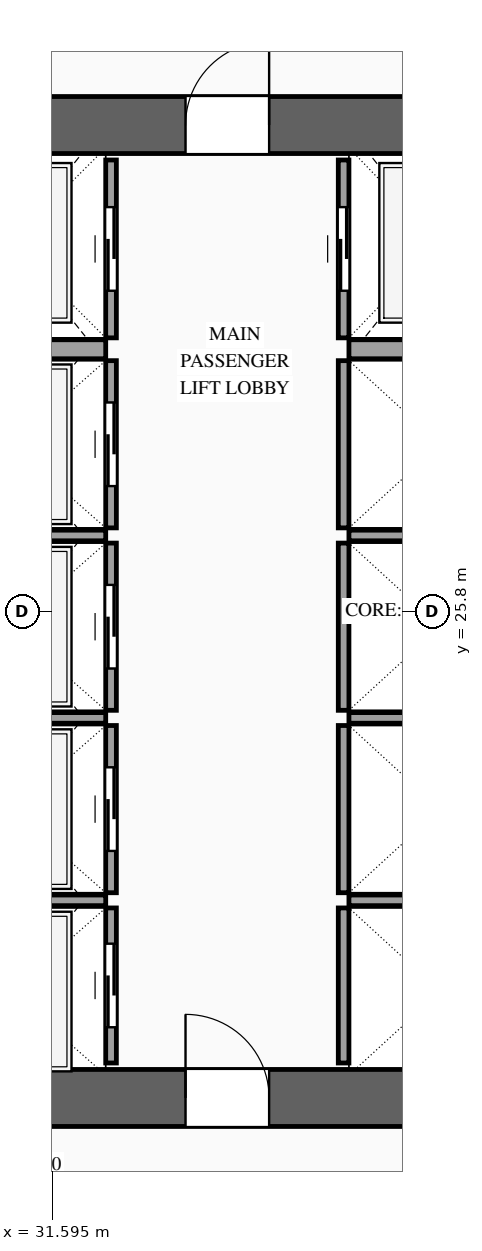
"""IFC4 building model, lengths in metres.
Left out: names, types, materials, properties, quantities, classifications, styles, units other than length and angle.
Written with IfcOpenShell. Run it as: python <this file> out.ifc"""

import sys

from ifc_helpers import new_model, si_unit, direction, frame, frame_2d, origin, place, context, subcontext, project, spatial, rectangle, extrude, source, transform, mapped, element, fill, save


model = new_model("IFC4")
c1 = context("Model", 3, precision=1e-05, world=origin(), true_north=direction((0.0, 1.0)))
c2 = subcontext(c1, "Body", "Model", "MODEL_VIEW")
j1 = project(units=[si_unit("LENGTHUNIT", "METRE"), si_unit("PLANEANGLEUNIT", "RADIAN")], contexts=[c1])
p1 = place(None, origin())
s1 = spatial("IfcSite", under=j1, at=p1, CompositionType="ELEMENT")
p2 = place(p1, origin())
s2 = spatial("IfcBuilding", under=s1, at=p2, CompositionType="ELEMENT")
p3 = place(p2, frame((0.0, 0.0, 163.2)))
s3 = spatial("IfcBuildingStorey", under=s2, at=p3, CompositionType="ELEMENT", Elevation=163.2)
p4 = place(p3, frame((23.425, 19.4, 0.0), z_axis=(0.0, 0.0, 1.0), x_axis=(1.0, 0.0, 0.0)))
e1 = element("IfcWall", 1, at=p4, inside=s3, PredefinedType="SHEAR", context=c2, shape_type="SweptSolid", body=[
    extrude(rectangle(XDim=27.15, YDim=0.75, at=frame_2d((13.575, 0.0))), origin(), (0.0, 0.0, 1.0), 3.6),
])
p5 = place(p4, frame((2.025, 0.0, 0.0)))
e2 = element("IfcOpeningElement", 2, at=p5, cuts=e1, PredefinedType="OPENING", context=c2, shape_type="SweptSolid", body=[
    extrude(rectangle(XDim=1.1, YDim=2.2, at=frame_2d((0.55, 1.1))), frame((0.0, 0.39, 0.0), z_axis=(0.0, -1.0, 0.0), x_axis=(1.0, 0.0, 0.0)), (0.0, 0.0, 1.0), 0.78),
])
p6 = place(p4, frame((9.925, 0.0, 0.0)))
e3 = element("IfcOpeningElement", 3, at=p6, cuts=e1, PredefinedType="OPENING", context=c2, shape_type="SweptSolid", body=[
    extrude(rectangle(XDim=1.1, YDim=2.2, at=frame_2d((0.55, 1.1))), frame((0.0, 0.39, 0.0), z_axis=(0.0, -1.0, 0.0), x_axis=(1.0, 0.0, 0.0)), (0.0, 0.0, 1.0), 0.78),
])
p7 = place(p4, frame((23.125, 0.0, 0.0)))
e4 = element("IfcOpeningElement", 4, at=p7, cuts=e1, PredefinedType="OPENING", context=c2, shape_type="SweptSolid", body=[
    extrude(rectangle(XDim=1.1, YDim=2.2, at=frame_2d((0.55, 1.1))), frame((0.0, 0.39, 0.0), z_axis=(0.0, -1.0, 0.0), x_axis=(1.0, 0.0, 0.0)), (0.0, 0.0, 1.0), 0.78),
])
p8 = place(p4, frame((19.745, 0.0, 0.0)))
e5 = element("IfcOpeningElement", 5, at=p8, cuts=e1, PredefinedType="OPENING", context=c2, shape_type="SweptSolid", body=[
    extrude(rectangle(XDim=0.9, YDim=2.15, at=frame_2d((0.45, 1.075))), frame((0.0, 0.39, 0.0), z_axis=(0.0, -1.0, 0.0), x_axis=(1.0, 0.0, 0.0)), (0.0, 0.0, 1.0), 0.78),
])
p9 = place(p4, frame((18.305, 0.0, 0.0)))
e6 = element("IfcOpeningElement", 6, at=p9, cuts=e1, PredefinedType="OPENING", context=c2, shape_type="SweptSolid", body=[
    extrude(rectangle(XDim=0.9, YDim=2.15, at=frame_2d((0.45, 1.075))), frame((0.0, 0.39, 0.0), z_axis=(0.0, -1.0, 0.0), x_axis=(1.0, 0.0, 0.0)), (0.0, 0.0, 1.0), 0.78),
])
p10 = place(p3, frame((23.425, 32.2, 0.0), z_axis=(0.0, 0.0, 1.0), x_axis=(1.0, 0.0, 0.0)))
e7 = element("IfcWall", 7, at=p10, inside=s3, PredefinedType="SHEAR", context=c2, shape_type="SweptSolid", body=[
    extrude(rectangle(XDim=27.15, YDim=0.75, at=frame_2d((13.575, 0.0))), origin(), (0.0, 0.0, 1.0), 3.6),
])
p11 = place(p10, frame((4.645, 0.0, 0.0)))
e8 = element("IfcOpeningElement", 8, at=p11, cuts=e7, PredefinedType="OPENING", context=c2, shape_type="SweptSolid", body=[
    extrude(rectangle(XDim=0.9, YDim=2.15, at=frame_2d((0.45, 1.075))), frame((0.0, 0.39, 0.0), z_axis=(0.0, -1.0, 0.0), x_axis=(1.0, 0.0, 0.0)), (0.0, 0.0, 1.0), 0.78),
])
p12 = place(p10, frame((9.925, 0.0, 0.0)))
e9 = element("IfcOpeningElement", 9, at=p12, cuts=e7, PredefinedType="OPENING", context=c2, shape_type="SweptSolid", body=[
    extrude(rectangle(XDim=1.1, YDim=2.2, at=frame_2d((0.55, 1.1))), frame((0.0, 0.39, 0.0), z_axis=(0.0, -1.0, 0.0), x_axis=(1.0, 0.0, 0.0)), (0.0, 0.0, 1.0), 0.78),
])
p13 = place(p10, frame((15.775, 0.0, 0.0)))
e10 = element("IfcOpeningElement", 10, at=p13, cuts=e7, PredefinedType="OPENING", context=c2, shape_type="SweptSolid", body=[
    extrude(rectangle(XDim=1.1, YDim=2.2, at=frame_2d((0.55, 1.1))), frame((0.0, 0.39, 0.0), z_axis=(0.0, -1.0, 0.0), x_axis=(1.0, 0.0, 0.0)), (0.0, 0.0, 1.0), 0.78),
])
p14 = place(p10, frame((18.305, 0.0, 0.0)))
e11 = element("IfcOpeningElement", 11, at=p14, cuts=e7, PredefinedType="OPENING", context=c2, shape_type="SweptSolid", body=[
    extrude(rectangle(XDim=0.9, YDim=2.15, at=frame_2d((0.45, 1.075))), frame((0.0, 0.39, 0.0), z_axis=(0.0, -1.0, 0.0), x_axis=(1.0, 0.0, 0.0)), (0.0, 0.0, 1.0), 0.78),
])
p15 = place(p10, frame((19.745, 0.0, 0.0)))
e12 = element("IfcOpeningElement", 12, at=p15, cuts=e7, PredefinedType="OPENING", context=c2, shape_type="SweptSolid", body=[
    extrude(rectangle(XDim=0.9, YDim=2.15, at=frame_2d((0.45, 1.075))), frame((0.0, 0.39, 0.0), z_axis=(0.0, -1.0, 0.0), x_axis=(1.0, 0.0, 0.0)), (0.0, 0.0, 1.0), 0.78),
])
p16 = place(p3, frame((32.37, 19.86, 0.0), z_axis=(0.0, 0.0, 1.0), x_axis=(0.0, 1.0, 0.0)))
e13 = element("IfcWall", 13, at=p16, inside=s3, PredefinedType="SOLIDWALL", context=c2, shape_type="SweptSolid", body=[
    extrude(rectangle(XDim=2.04, YDim=0.14, at=frame_2d((1.02, 0.0))), origin(), (0.0, 0.0, 1.0), 3.3),
])
p17 = place(p16, frame((0.47, 0.0, 0.0)))
e14 = element("IfcOpeningElement", 14, at=p17, cuts=e13, PredefinedType="OPENING", context=c2, shape_type="SweptSolid", body=[
    extrude(rectangle(XDim=1.1, YDim=2.2, at=frame_2d((0.55, 1.1))), frame((0.0, 0.085, 0.0), z_axis=(0.0, -1.0, 0.0), x_axis=(1.0, 0.0, 0.0)), (0.0, 0.0, 1.0), 0.17),
])
m1 = source(origin(), c2, "Body", "SweptSolid", [
    extrude(rectangle(XDim=2.5, YDim=0.14, at=frame_2d((1.25, 0.0))), origin(), (0.0, 0.0, 1.0), 3.3),
])
p18 = place(p3, frame((29.8, 22.0, 0.0), z_axis=(0.0, 0.0, 1.0), x_axis=(1.0, 0.0, 0.0)))
e15 = element("IfcWall", 15, at=p18, inside=s3, PredefinedType="SOLIDWALL", context=c2, shape_type="MappedRepresentation", body=[
    mapped(m1, transform((0.0, 0.0, 0.0), scale=1.0)),
])
p19 = place(p3, frame((32.37, 22.1, 0.0), z_axis=(0.0, 0.0, 1.0), x_axis=(0.0, 1.0, 0.0)))
e16 = element("IfcWall", 16, at=p19, inside=s3, PredefinedType="SOLIDWALL", context=c2, shape_type="SweptSolid", body=[
    extrude(rectangle(XDim=2.2, YDim=0.14, at=frame_2d((1.1, 0.0))), origin(), (0.0, 0.0, 1.0), 3.3),
])
p20 = place(p19, frame((0.55, 0.0, 0.0)))
e17 = element("IfcOpeningElement", 17, at=p20, cuts=e16, PredefinedType="OPENING", context=c2, shape_type="SweptSolid", body=[
    extrude(rectangle(XDim=1.1, YDim=2.2, at=frame_2d((0.55, 1.1))), frame((0.0, 0.085, 0.0), z_axis=(0.0, -1.0, 0.0), x_axis=(1.0, 0.0, 0.0)), (0.0, 0.0, 1.0), 0.17),
])
p21 = place(p3, frame((29.8, 24.4, 0.0), z_axis=(0.0, 0.0, 1.0), x_axis=(1.0, 0.0, 0.0)))
e18 = element("IfcWall", 18, at=p21, inside=s3, PredefinedType="SOLIDWALL", context=c2, shape_type="MappedRepresentation", body=[
    mapped(m1, transform((0.0, 0.0, 0.0), scale=1.0)),
])
p22 = place(p3, frame((32.37, 24.5, 0.0), z_axis=(0.0, 0.0, 1.0), x_axis=(0.0, 1.0, 0.0)))
e19 = element("IfcWall", 19, at=p22, inside=s3, PredefinedType="SOLIDWALL", context=c2, shape_type="SweptSolid", body=[
    extrude(rectangle(XDim=2.2, YDim=0.14, at=frame_2d((1.1, 0.0))), origin(), (0.0, 0.0, 1.0), 3.3),
])
p23 = place(p22, frame((0.55, 0.0, 0.0)))
e20 = element("IfcOpeningElement", 20, at=p23, cuts=e19, PredefinedType="OPENING", context=c2, shape_type="SweptSolid", body=[
    extrude(rectangle(XDim=1.1, YDim=2.2, at=frame_2d((0.55, 1.1))), frame((0.0, 0.085, 0.0), z_axis=(0.0, -1.0, 0.0), x_axis=(1.0, 0.0, 0.0)), (0.0, 0.0, 1.0), 0.17),
])
p24 = place(p3, frame((29.8, 26.8, 0.0), z_axis=(0.0, 0.0, 1.0), x_axis=(1.0, 0.0, 0.0)))
e21 = element("IfcWall", 21, at=p24, inside=s3, PredefinedType="SOLIDWALL", context=c2, shape_type="MappedRepresentation", body=[
    mapped(m1, transform((0.0, 0.0, 0.0), scale=1.0)),
])
p25 = place(p3, frame((32.37, 26.9, 0.0), z_axis=(0.0, 0.0, 1.0), x_axis=(0.0, 1.0, 0.0)))
e22 = element("IfcWall", 22, at=p25, inside=s3, PredefinedType="SOLIDWALL", context=c2, shape_type="SweptSolid", body=[
    extrude(rectangle(XDim=2.2, YDim=0.14, at=frame_2d((1.1, 0.0))), origin(), (0.0, 0.0, 1.0), 3.3),
])
p26 = place(p25, frame((0.55, 0.0, 0.0)))
e23 = element("IfcOpeningElement", 23, at=p26, cuts=e22, PredefinedType="OPENING", context=c2, shape_type="SweptSolid", body=[
    extrude(rectangle(XDim=1.1, YDim=2.2, at=frame_2d((0.55, 1.1))), frame((0.0, 0.085, 0.0), z_axis=(0.0, -1.0, 0.0), x_axis=(1.0, 0.0, 0.0)), (0.0, 0.0, 1.0), 0.17),
])
p27 = place(p3, frame((32.37, 29.4, 0.0), z_axis=(0.0, 0.0, 1.0), x_axis=(0.0, 1.0, 0.0)))
e24 = element("IfcWall", 24, at=p27, inside=s3, PredefinedType="SOLIDWALL", context=c2, shape_type="SweptSolid", body=[
    extrude(rectangle(XDim=2.34, YDim=0.14, at=frame_2d((1.17, 0.0))), origin(), (0.0, 0.0, 1.0), 3.3),
])
p28 = place(p27, frame((0.62, 0.0, 0.0)))
e25 = element("IfcOpeningElement", 25, at=p28, cuts=e24, PredefinedType="OPENING", context=c2, shape_type="SweptSolid", body=[
    extrude(rectangle(XDim=1.1, YDim=2.2, at=frame_2d((0.55, 1.1))), frame((0.0, 0.085, 0.0), z_axis=(0.0, -1.0, 0.0), x_axis=(1.0, 0.0, 0.0)), (0.0, 0.0, 1.0), 0.17),
])
m2 = source(origin(), c2, "Body", "SweptSolid", [
    extrude(rectangle(XDim=2.5, YDim=0.25, at=frame_2d((1.25, 0.0))), origin(), (0.0, 0.0, 1.0), 3.3),
])
p29 = place(p3, frame((29.8, 29.25, 0.0), z_axis=(0.0, 0.0, 1.0), x_axis=(1.0, 0.0, 0.0)))
e26 = element("IfcWall", 26, at=p29, inside=s3, PredefinedType="SOLIDWALL", context=c2, shape_type="MappedRepresentation", body=[
    mapped(m2, transform((0.0, 0.0, 0.0), scale=1.0)),
])
m3 = source(origin(), c2, "Body", "SweptSolid", [
    extrude(rectangle(XDim=2.04, YDim=0.14, at=frame_2d((1.02, 0.0))), origin(), (0.0, 0.0, 1.0), 3.3),
])
p30 = place(p3, frame((35.43, 19.86, 0.0), z_axis=(0.0, 0.0, 1.0), x_axis=(0.0, 1.0, 0.0)))
e27 = element("IfcWall", 27, at=p30, inside=s3, PredefinedType="SOLIDWALL", context=c2, shape_type="MappedRepresentation", body=[
    mapped(m3, transform((0.0, 0.0, 0.0), scale=1.0)),
])
m4 = source(origin(), c2, "Body", "SweptSolid", [
    extrude(rectangle(XDim=2.4, YDim=0.14, at=frame_2d((1.2, 0.0))), origin(), (0.0, 0.0, 1.0), 3.3),
])
p31 = place(p3, frame((35.5, 22.0, 0.0), z_axis=(0.0, 0.0, 1.0), x_axis=(1.0, 0.0, 0.0)))
e28 = element("IfcWall", 28, at=p31, inside=s3, PredefinedType="SOLIDWALL", context=c2, shape_type="MappedRepresentation", body=[
    mapped(m4, transform((0.0, 0.0, 0.0), scale=1.0)),
])
m5 = source(origin(), c2, "Body", "SweptSolid", [
    extrude(rectangle(XDim=2.2, YDim=0.14, at=frame_2d((1.1, 0.0))), origin(), (0.0, 0.0, 1.0), 3.3),
])
p32 = place(p3, frame((35.43, 22.1, 0.0), z_axis=(0.0, 0.0, 1.0), x_axis=(0.0, 1.0, 0.0)))
e29 = element("IfcWall", 29, at=p32, inside=s3, PredefinedType="SOLIDWALL", context=c2, shape_type="MappedRepresentation", body=[
    mapped(m5, transform((0.0, 0.0, 0.0), scale=1.0)),
])
p33 = place(p3, frame((35.5, 24.4, 0.0), z_axis=(0.0, 0.0, 1.0), x_axis=(1.0, 0.0, 0.0)))
e30 = element("IfcWall", 30, at=p33, inside=s3, PredefinedType="SOLIDWALL", context=c2, shape_type="MappedRepresentation", body=[
    mapped(m4, transform((0.0, 0.0, 0.0), scale=1.0)),
])
p34 = place(p3, frame((35.43, 24.5, 0.0), z_axis=(0.0, 0.0, 1.0), x_axis=(0.0, 1.0, 0.0)))
e31 = element("IfcWall", 31, at=p34, inside=s3, PredefinedType="SOLIDWALL", context=c2, shape_type="MappedRepresentation", body=[
    mapped(m5, transform((0.0, 0.0, 0.0), scale=1.0)),
])
p35 = place(p3, frame((35.5, 26.8, 0.0), z_axis=(0.0, 0.0, 1.0), x_axis=(1.0, 0.0, 0.0)))
e32 = element("IfcWall", 32, at=p35, inside=s3, PredefinedType="SOLIDWALL", context=c2, shape_type="MappedRepresentation", body=[
    mapped(m4, transform((0.0, 0.0, 0.0), scale=1.0)),
])
m6 = source(origin(), c2, "Body", "SweptSolid", [
    extrude(rectangle(XDim=2.2, YDim=0.14, at=frame_2d((1.1, 0.0))), origin(), (0.0, 0.0, 1.0), 3.3),
])
p36 = place(p3, frame((35.43, 26.9, 0.0), z_axis=(0.0, 0.0, 1.0), x_axis=(0.0, 1.0, 0.0)))
e33 = element("IfcWall", 33, at=p36, inside=s3, PredefinedType="SOLIDWALL", context=c2, shape_type="MappedRepresentation", body=[
    mapped(m6, transform((0.0, 0.0, 0.0), scale=1.0)),
])
p37 = place(p3, frame((35.43, 29.4, 0.0), z_axis=(0.0, 0.0, 1.0), x_axis=(0.0, 1.0, 0.0)))
e34 = element("IfcWall", 34, at=p37, inside=s3, PredefinedType="SOLIDWALL", context=c2, shape_type="SweptSolid", body=[
    extrude(rectangle(XDim=2.34, YDim=0.14, at=frame_2d((1.17, 0.0))), origin(), (0.0, 0.0, 1.0), 3.3),
])
p38 = place(p37, frame((0.62, 0.0, 0.0)))
e35 = element("IfcOpeningElement", 35, at=p38, cuts=e34, PredefinedType="OPENING", context=c2, shape_type="SweptSolid", body=[
    extrude(rectangle(XDim=1.1, YDim=2.2, at=frame_2d((0.55, 1.1))), frame((0.0, 0.085, 0.0), z_axis=(0.0, -1.0, 0.0), x_axis=(1.0, 0.0, 0.0)), (0.0, 0.0, 1.0), 0.17),
])
m7 = source(origin(), c2, "Body", "SweptSolid", [
    extrude(rectangle(XDim=2.4, YDim=0.25, at=frame_2d((1.2, 0.0))), origin(), (0.0, 0.0, 1.0), 3.3),
])
p39 = place(p3, frame((35.5, 29.25, 0.0), z_axis=(0.0, 0.0, 1.0), x_axis=(1.0, 0.0, 0.0)))
e36 = element("IfcWall", 36, at=p39, inside=s3, PredefinedType="SOLIDWALL", context=c2, shape_type="MappedRepresentation", body=[
    mapped(m7, transform((0.0, 0.0, 0.0), scale=1.0)),
])
m8 = source(origin(), c2, "Body", "SweptSolid", [
    extrude(rectangle(XDim=1.1, YDim=2.2, at=frame_2d((0.55, 1.1))), frame((0.0, 0.025, 0.0), z_axis=(0.0, -1.0, 0.0), x_axis=(1.0, 0.0, 0.0)), (0.0, 0.0, 1.0), 0.05),
])
p40 = place(p17, origin())
e37 = element("IfcDoor", 37, at=p40, inside=s3, OperationType="SLIDING_TO_LEFT", PredefinedType="DOOR", context=c2, shape_type="MappedRepresentation", body=[
    mapped(m8, transform((0.0, 0.0, 0.0), scale=1.0)),
])
fill(e14, e37)
p41 = place(p20, origin())
e38 = element("IfcDoor", 38, at=p41, inside=s3, OperationType="SLIDING_TO_RIGHT", PredefinedType="DOOR", context=c2, shape_type="MappedRepresentation", body=[
    mapped(m8, transform((0.0, 0.0, 0.0), scale=1.0)),
])
fill(e17, e38)
p42 = place(p23, origin())
e39 = element("IfcDoor", 39, at=p42, inside=s3, OperationType="SLIDING_TO_LEFT", PredefinedType="DOOR", context=c2, shape_type="MappedRepresentation", body=[
    mapped(m8, transform((0.0, 0.0, 0.0), scale=1.0)),
])
fill(e20, e39)
p43 = place(p26, origin())
e40 = element("IfcDoor", 40, at=p43, inside=s3, OperationType="SLIDING_TO_RIGHT", PredefinedType="DOOR", context=c2, shape_type="MappedRepresentation", body=[
    mapped(m8, transform((0.0, 0.0, 0.0), scale=1.0)),
])
fill(e23, e40)
p44 = place(p28, origin())
e41 = element("IfcDoor", 41, at=p44, inside=s3, OperationType="SLIDING_TO_LEFT", PredefinedType="DOOR", context=c2, shape_type="MappedRepresentation", body=[
    mapped(m8, transform((0.0, 0.0, 0.0), scale=1.0)),
])
fill(e25, e41)
p45 = place(p38, origin())
e42 = element("IfcDoor", 42, at=p45, inside=s3, OperationType="SLIDING_TO_RIGHT", PredefinedType="DOOR", context=c2, shape_type="MappedRepresentation", body=[
    mapped(m8, transform((0.0, 0.0, 0.0), scale=1.0)),
])
fill(e35, e42)
m9 = source(origin(), c2, "Body", "SweptSolid", [
    extrude(rectangle(XDim=1.1, YDim=2.2, at=frame_2d((0.55, 1.1))), frame((0.0, 0.025, 0.0), z_axis=(0.0, -1.0, 0.0), x_axis=(1.0, 0.0, 0.0)), (0.0, 0.0, 1.0), 0.05),
])
p46 = place(p6, origin())
e43 = element("IfcDoor", 43, at=p46, inside=s3, OperationType="SINGLE_SWING_LEFT", PredefinedType="DOOR", context=c2, shape_type="MappedRepresentation", body=[
    mapped(m9, transform((0.0, 0.0, 0.0), scale=1.0)),
])
fill(e3, e43)
p47 = place(p12, origin())
e44 = element("IfcDoor", 44, at=p47, inside=s3, OperationType="SINGLE_SWING_RIGHT", PredefinedType="DOOR", context=c2, shape_type="MappedRepresentation", body=[
    mapped(m9, transform((0.0, 0.0, 0.0), scale=1.0)),
])
fill(e9, e44)
save(model, sys.argv[1])
